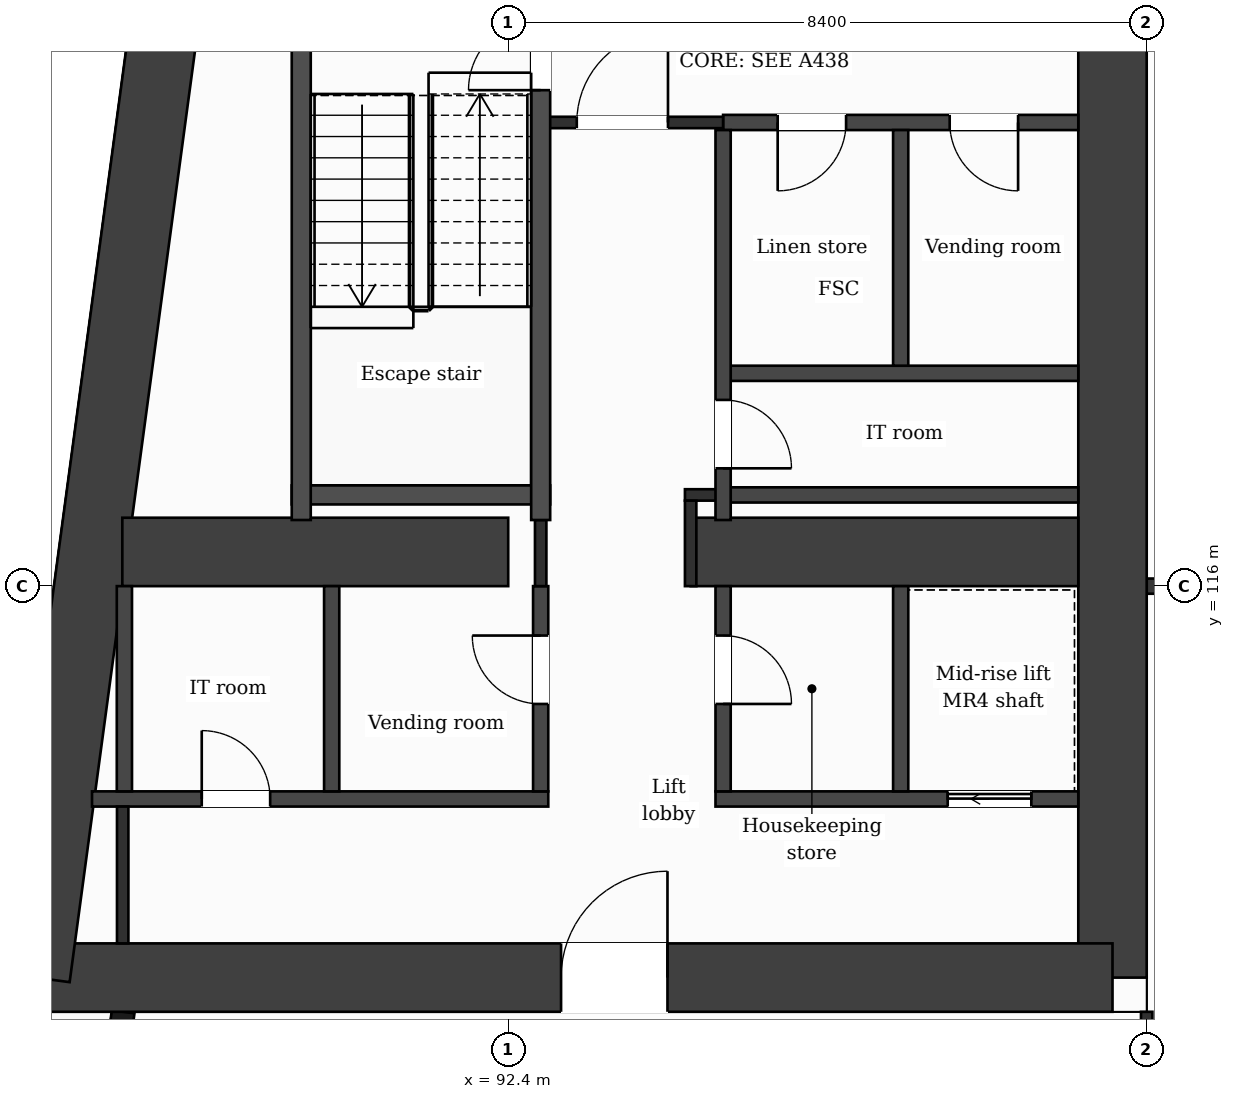
"""IFC4 building model, lengths in metres.
Left out: names, types, materials, properties, quantities, classifications, styles, units other than length and angle.
Written with IfcOpenShell. Run it as: python <this file> out.ifc"""

import sys

from ifc_helpers import new_model, si_unit, direction, frame, frame_2d, origin, place, context, subcontext, project, spatial, rectangle, extrude, element, fill, save


model = new_model("IFC4")
c1 = context("Model", 3, precision=1e-05, world=origin(), true_north=direction((0.0, 1.0)))
c2 = subcontext(c1, "Body", "Model", "MODEL_VIEW")
j1 = project(units=[si_unit("LENGTHUNIT", "METRE"), si_unit("PLANEANGLEUNIT", "RADIAN")], contexts=[c1])
p1 = place(None, origin())
s1 = spatial("IfcSite", under=j1, at=p1, CompositionType="ELEMENT")
p2 = place(p1, origin())
s2 = spatial("IfcBuilding", under=s1, at=p2, CompositionType="ELEMENT")
p3 = place(p2, frame((0.0, 0.0, 158.9)))
s3 = spatial("IfcBuildingStorey", under=s2, at=p3, CompositionType="ELEMENT", Elevation=158.9)
p4 = place(p3, frame((100.35, 131.95, 0.0), z_axis=(0.0, 0.0, 1.0), x_axis=(0.0, -1.0, 0.0)))
e1 = element("IfcWall", 1, at=p4, inside=s3, PredefinedType="SHEAR", context=c2, shape_type="SweptSolid", body=[
    extrude(rectangle(XDim=21.1, YDim=0.9, at=frame_2d((10.55, 0.0))), origin(), (0.0, 0.0, 1.0), 3.7),
])
p5 = place(p3, frame((100.35, 110.85, 0.0), z_axis=(0.0, 0.0, 1.0), x_axis=(-1.0, 0.0, 0.0)))
e2 = element("IfcWall", 2, at=p5, inside=s3, PredefinedType="SHEAR", context=c2, shape_type="SweptSolid", body=[
    extrude(rectangle(XDim=14.166, YDim=0.9, at=frame_2d((7.083, 0.0))), origin(), (0.0, 0.0, 1.0), 3.7),
])
p6 = place(p5, frame((5.855, 0.0, 0.0)))
e3 = element("IfcOpeningElement", 3, at=p6, cuts=e2, PredefinedType="OPENING", context=c2, shape_type="SweptSolid", body=[
    extrude(rectangle(XDim=1.4, YDim=2.1, at=frame_2d((0.7, 1.05))), frame((0.0, 0.46, 0.0), z_axis=(0.0, -1.0, 0.0), x_axis=(1.0, 0.0, 0.0)), (0.0, 0.0, 1.0), 0.92),
])
p7 = place(p3, frame((86.184, 110.85, 0.0), z_axis=(0.0, 0.0, 1.0), x_axis=(0.133410495943, 0.991060865725, 0.0)))
e4 = element("IfcWall", 4, at=p7, inside=s3, PredefinedType="SHEAR", context=c2, shape_type="SweptSolid", body=[
    extrude(rectangle(XDim=21.29, YDim=0.9, at=frame_2d((10.645, 0.0))), origin(), (0.0, 0.0, 1.0), 3.7),
])
p8 = place(p3, frame((87.323, 116.45, 0.0), z_axis=(0.0, 0.0, 1.0), x_axis=(1.0, 0.0, 0.0)))
e5 = element("IfcWall", 5, at=p8, inside=s3, PredefinedType="SHEAR", context=c2, shape_type="SweptSolid", body=[
    extrude(rectangle(XDim=5.077, YDim=0.9, at=frame_2d((2.539, 0.0))), origin(), (0.0, 0.0, 1.0), 3.7),
])
p9 = place(p3, frame((94.8, 116.45, 0.0), z_axis=(0.0, 0.0, 1.0), x_axis=(1.0, 0.0, 0.0)))
e6 = element("IfcWall", 6, at=p9, inside=s3, PredefinedType="SHEAR", context=c2, shape_type="SweptSolid", body=[
    extrude(rectangle(XDim=5.1, YDim=0.9, at=frame_2d((2.55, 0.0))), origin(), (0.0, 0.0, 1.0), 3.7),
])
p10 = place(p3, frame((87.334, 110.4, 0.0), z_axis=(0.0, 0.0, 1.0), x_axis=(-0.133437175554, -0.991057273915, 0.0)))
e7 = element("IfcWall", 7, at=p10, inside=s3, PredefinedType="SOLIDWALL", context=c2, shape_type="SweptSolid", body=[
    extrude(rectangle(XDim=6.781, YDim=0.3, at=frame_2d((3.39, 0.0))), origin(), (0.0, 0.0, 1.0), 3.38),
])
p11 = place(p10, frame((1.418, 0.0, 0.0)))
e8 = element("IfcOpeningElement", 8, at=p11, cuts=e7, PredefinedType="OPENING", context=c2, shape_type="SweptSolid", body=[
    extrude(rectangle(XDim=1.2, YDim=2.4, at=frame_2d((0.6, 1.2))), frame((0.0, 0.16, 0.0), z_axis=(0.0, -1.0, 0.0), x_axis=(1.0, 0.0, 0.0)), (0.0, 0.0, 1.0), 0.32),
])
p12 = place(p10, frame((4.758, 0.0, 0.9)))
e9 = element("IfcOpeningElement", 9, at=p12, cuts=e7, PredefinedType="OPENING", context=c2, shape_type="SweptSolid", body=[
    extrude(rectangle(XDim=1.2, YDim=2.1, at=frame_2d((0.6, 1.05))), frame((0.0, 0.16, 0.0), z_axis=(0.0, -1.0, 0.0), x_axis=(1.0, 0.0, 0.0)), (0.0, 0.0, 1.0), 0.32),
])
p13 = place(p3, frame((86.924, 113.2, 0.0), z_axis=(0.0, 0.0, 1.0), x_axis=(1.0, 0.0, 0.0)))
e10 = element("IfcWall", 10, at=p13, inside=s3, PredefinedType="PARTITIONING", context=c2, shape_type="SweptSolid", body=[
    extrude(rectangle(XDim=6.003, YDim=0.2, at=frame_2d((3.001, 0.0))), origin(), (0.0, 0.0, 1.0), 3.38),
])
p14 = place(p13, frame((1.444, 0.0, 0.0)))
e11 = element("IfcOpeningElement", 11, at=p14, cuts=e10, PredefinedType="OPENING", context=c2, shape_type="SweptSolid", body=[
    extrude(rectangle(XDim=0.9, YDim=2.1, at=frame_2d((0.45, 1.05))), frame((0.0, 0.11, 0.0), z_axis=(0.0, -1.0, 0.0), x_axis=(1.0, 0.0, 0.0)), (0.0, 0.0, 1.0), 0.22),
])
p15 = place(p3, frame((95.127, 113.2, 0.0), z_axis=(0.0, 0.0, 1.0), x_axis=(1.0, 0.0, 0.0)))
e12 = element("IfcWall", 12, at=p15, inside=s3, PredefinedType="PARTITIONING", context=c2, shape_type="SweptSolid", body=[
    extrude(rectangle(XDim=4.773, YDim=0.2, at=frame_2d((2.386, 0.0))), origin(), (0.0, 0.0, 1.0), 3.38),
])
p16 = place(p15, frame((3.055, 0.0, 0.0)))
e13 = element("IfcOpeningElement", 13, at=p16, cuts=e12, PredefinedType="OPENING", context=c2, shape_type="SweptSolid", body=[
    extrude(rectangle(XDim=1.1, YDim=2.1, at=frame_2d((0.55, 1.05))), frame((0.0, 0.11, 0.0), z_axis=(0.0, -1.0, 0.0), x_axis=(1.0, 0.0, 0.0)), (0.0, 0.0, 1.0), 0.22),
])
p17 = place(p3, frame((100.8, 116.0, 0.0), z_axis=(0.0, 0.0, 1.0), x_axis=(1.0, 0.0, 0.0)))
e14 = element("IfcWall", 14, at=p17, inside=s3, PredefinedType="PARTITIONING", context=c2, shape_type="SweptSolid", body=[
    extrude(rectangle(XDim=8.4, YDim=0.2, at=frame_2d((4.2, 0.0))), origin(), (0.0, 0.0, 1.0), 3.38),
])
p18 = place(p3, frame((95.227, 117.2, 0.0), z_axis=(0.0, 0.0, 1.0), x_axis=(1.0, 0.0, 0.0)))
e15 = element("IfcWall", 15, at=p18, inside=s3, PredefinedType="PARTITIONING", context=c2, shape_type="SweptSolid", body=[
    extrude(rectangle(XDim=4.673, YDim=0.2, at=frame_2d((2.336, 0.0))), origin(), (0.0, 0.0, 1.0), 3.38),
])
p19 = place(p3, frame((94.725, 117.2, 0.0), z_axis=(0.0, 0.0, 1.0), x_axis=(1.0, 0.0, 0.0)))
e16 = element("IfcWall", 16, at=p19, inside=s3, PredefinedType="PARTITIONING", context=c2, shape_type="SweptSolid", body=[
    extrude(rectangle(XDim=0.502, YDim=0.15, at=frame_2d((0.251, 0.0))), origin(), (0.0, 0.0, 1.0), 3.38),
])
p20 = place(p3, frame((89.552, 117.2, 0.0), z_axis=(0.0, 0.0, 1.0), x_axis=(1.0, 0.0, 0.0)))
e17 = element("IfcWall", 17, at=p20, inside=s3, PredefinedType="PARTITIONING", context=c2, shape_type="SweptSolid", body=[
    extrude(rectangle(XDim=3.4, YDim=0.25, at=frame_2d((1.7, 0.0))), origin(), (0.0, 0.0, 1.0), 3.38),
])
p21 = place(p3, frame((95.227, 118.8, 0.0), z_axis=(0.0, 0.0, 1.0), x_axis=(1.0, 0.0, 0.0)))
e18 = element("IfcWall", 18, at=p21, inside=s3, PredefinedType="PARTITIONING", context=c2, shape_type="SweptSolid", body=[
    extrude(rectangle(XDim=4.673, YDim=0.2, at=frame_2d((2.336, 0.0))), origin(), (0.0, 0.0, 1.0), 3.38),
])
p22 = place(p3, frame((95.227, 122.1, 0.0), z_axis=(0.0, 0.0, 1.0), x_axis=(1.0, 0.0, 0.0)))
e19 = element("IfcWall", 19, at=p22, inside=s3, PredefinedType="PARTITIONING", context=c2, shape_type="SweptSolid", body=[
    extrude(rectangle(XDim=4.673, YDim=0.2, at=frame_2d((2.336, 0.0))), origin(), (0.0, 0.0, 1.0), 3.38),
])
p23 = place(p22, frame((0.718, 0.0, 0.0)))
e20 = element("IfcOpeningElement", 20, at=p23, cuts=e19, PredefinedType="OPENING", context=c2, shape_type="SweptSolid", body=[
    extrude(rectangle(XDim=0.9, YDim=2.1, at=frame_2d((0.45, 1.05))), frame((0.0, 0.11, 0.0), z_axis=(0.0, -1.0, 0.0), x_axis=(1.0, 0.0, 0.0)), (0.0, 0.0, 1.0), 0.22),
])
p24 = place(p22, frame((2.981, 0.0, 0.0)))
e21 = element("IfcOpeningElement", 21, at=p24, cuts=e19, PredefinedType="OPENING", context=c2, shape_type="SweptSolid", body=[
    extrude(rectangle(XDim=0.9, YDim=2.1, at=frame_2d((0.45, 1.05))), frame((0.0, 0.11, 0.0), z_axis=(0.0, -1.0, 0.0), x_axis=(1.0, 0.0, 0.0)), (0.0, 0.0, 1.0), 0.22),
])
p25 = place(p3, frame((92.827, 122.1, 0.0), z_axis=(0.0, 0.0, 1.0), x_axis=(1.0, 0.0, 0.0)))
e22 = element("IfcWall", 22, at=p25, inside=s3, PredefinedType="PARTITIONING", context=c2, shape_type="SweptSolid", body=[
    extrude(rectangle(XDim=2.4, YDim=0.15, at=frame_2d((1.2, 0.0))), origin(), (0.0, 0.0, 1.0), 3.38),
])
p26 = place(p25, frame((0.475, 0.0, 0.0)))
e23 = element("IfcOpeningElement", 23, at=p26, cuts=e22, PredefinedType="OPENING", context=c2, shape_type="SweptSolid", body=[
    extrude(rectangle(XDim=1.2, YDim=2.1, at=frame_2d((0.6, 1.05))), frame((0.0, 0.085, 0.0), z_axis=(0.0, -1.0, 0.0), x_axis=(1.0, 0.0, 0.0)), (0.0, 0.0, 1.0), 0.17),
])
p27 = place(p3, frame((87.35, 113.3, 0.0), z_axis=(0.0, 0.0, 1.0), x_axis=(0.0, 1.0, 0.0)))
e24 = element("IfcWall", 24, at=p27, inside=s3, PredefinedType="PARTITIONING", context=c2, shape_type="SweptSolid", body=[
    extrude(rectangle(XDim=2.7, YDim=0.2, at=frame_2d((1.35, 0.0))), origin(), (0.0, 0.0, 1.0), 3.38),
])
p28 = place(p3, frame((87.328, 111.3, 0.0), z_axis=(0.0, 0.0, 1.0), x_axis=(0.0, 1.0, 0.0)))
e25 = element("IfcWall", 25, at=p28, inside=s3, PredefinedType="PARTITIONING", context=c2, shape_type="SweptSolid", body=[
    extrude(rectangle(XDim=1.8, YDim=0.15, at=frame_2d((0.9, 0.0))), origin(), (0.0, 0.0, 1.0), 3.38),
])
p29 = place(p3, frame((89.677, 116.87, 0.0), z_axis=(0.0, 0.0, 1.0), x_axis=(0.0, 1.0, 0.0)))
e26 = element("IfcWall", 26, at=p29, inside=s3, PredefinedType="PARTITIONING", context=c2, shape_type="SweptSolid", body=[
    extrude(rectangle(XDim=6.955, YDim=0.25, at=frame_2d((3.478, 0.0))), origin(), (0.0, 0.0, 1.0), 3.38),
])
p30 = place(p3, frame((90.077, 113.3, 0.0), z_axis=(0.0, 0.0, 1.0), x_axis=(0.0, 1.0, 0.0)))
e27 = element("IfcWall", 27, at=p30, inside=s3, PredefinedType="PARTITIONING", context=c2, shape_type="SweptSolid", body=[
    extrude(rectangle(XDim=2.7, YDim=0.2, at=frame_2d((1.35, 0.0))), origin(), (0.0, 0.0, 1.0), 3.38),
])
p31 = place(p3, frame((92.827, 113.3, 0.0), z_axis=(0.0, 0.0, 1.0), x_axis=(0.0, 1.0, 0.0)))
e28 = element("IfcWall", 28, at=p31, inside=s3, PredefinedType="PARTITIONING", context=c2, shape_type="SweptSolid", body=[
    extrude(rectangle(XDim=2.7, YDim=0.2, at=frame_2d((1.35, 0.0))), origin(), (0.0, 0.0, 1.0), 3.38),
])
p32 = place(p31, frame((1.15, 0.0, 0.0)))
e29 = element("IfcOpeningElement", 29, at=p32, cuts=e28, PredefinedType="OPENING", context=c2, shape_type="SweptSolid", body=[
    extrude(rectangle(XDim=0.9, YDim=2.1, at=frame_2d((0.45, 1.05))), frame((0.0, 0.11, 0.0), z_axis=(0.0, -1.0, 0.0), x_axis=(1.0, 0.0, 0.0)), (0.0, 0.0, 1.0), 0.22),
])
p33 = place(p3, frame((92.827, 116.0, 0.0), z_axis=(0.0, 0.0, 1.0), x_axis=(0.0, 1.0, 0.0)))
e30 = element("IfcWall", 30, at=p33, inside=s3, PredefinedType="PARTITIONING", context=c2, shape_type="SweptSolid", body=[
    extrude(rectangle(XDim=0.87, YDim=0.15, at=frame_2d((0.435, 0.0))), origin(), (0.0, 0.0, 1.0), 3.38),
])
p34 = place(p3, frame((92.827, 116.87, 0.0), z_axis=(0.0, 0.0, 1.0), x_axis=(0.0, 1.0, 0.0)))
e31 = element("IfcWall", 31, at=p34, inside=s3, PredefinedType="PARTITIONING", context=c2, shape_type="SweptSolid", body=[
    extrude(rectangle(XDim=6.955, YDim=0.25, at=frame_2d((3.478, 0.0))), origin(), (0.0, 0.0, 1.0), 3.38),
])
p35 = place(p34, frame((5.655, 0.0, 0.0)))
e32 = element("IfcOpeningElement", 32, at=p35, cuts=e31, PredefinedType="OPENING", context=c2, shape_type="SweptSolid", body=[
    extrude(rectangle(XDim=0.95, YDim=2.1, at=frame_2d((0.475, 1.05))), frame((0.0, 0.135, 0.0), z_axis=(0.0, -1.0, 0.0), x_axis=(1.0, 0.0, 0.0)), (0.0, 0.0, 1.0), 0.27),
])
p36 = place(p3, frame((94.8, 116.0, 0.0), z_axis=(0.0, 0.0, 1.0), x_axis=(0.0, 1.0, 0.0)))
e33 = element("IfcWall", 33, at=p36, inside=s3, PredefinedType="PARTITIONING", context=c2, shape_type="SweptSolid", body=[
    extrude(rectangle(XDim=1.125, YDim=0.15, at=frame_2d((0.562, 0.0))), origin(), (0.0, 0.0, 1.0), 3.38),
])
p37 = place(p3, frame((95.227, 113.3, 0.0), z_axis=(0.0, 0.0, 1.0), x_axis=(0.0, 1.0, 0.0)))
e34 = element("IfcWall", 34, at=p37, inside=s3, PredefinedType="PARTITIONING", context=c2, shape_type="SweptSolid", body=[
    extrude(rectangle(XDim=2.7, YDim=0.2, at=frame_2d((1.35, 0.0))), origin(), (0.0, 0.0, 1.0), 3.38),
])
p38 = place(p37, frame((1.15, 0.0, 0.0)))
e35 = element("IfcOpeningElement", 35, at=p38, cuts=e34, PredefinedType="OPENING", context=c2, shape_type="SweptSolid", body=[
    extrude(rectangle(XDim=0.9, YDim=2.1, at=frame_2d((0.45, 1.05))), frame((0.0, 0.11, 0.0), z_axis=(0.0, -1.0, 0.0), x_axis=(1.0, 0.0, 0.0)), (0.0, 0.0, 1.0), 0.22),
])
p39 = place(p3, frame((95.227, 116.87, 0.0), z_axis=(0.0, 0.0, 1.0), x_axis=(0.0, 1.0, 0.0)))
e36 = element("IfcWall", 36, at=p39, inside=s3, PredefinedType="PARTITIONING", context=c2, shape_type="SweptSolid", body=[
    extrude(rectangle(XDim=5.13, YDim=0.2, at=frame_2d((2.565, 0.0))), origin(), (0.0, 0.0, 1.0), 3.38),
])
p40 = place(p39, frame((0.68, 0.0, 0.0)))
e37 = element("IfcOpeningElement", 37, at=p40, cuts=e36, PredefinedType="OPENING", context=c2, shape_type="SweptSolid", body=[
    extrude(rectangle(XDim=0.9, YDim=2.1, at=frame_2d((0.45, 1.05))), frame((0.0, 0.11, 0.0), z_axis=(0.0, -1.0, 0.0), x_axis=(1.0, 0.0, 0.0)), (0.0, 0.0, 1.0), 0.22),
])
p41 = place(p3, frame((97.563, 113.3, 0.0), z_axis=(0.0, 0.0, 1.0), x_axis=(0.0, 1.0, 0.0)))
e38 = element("IfcWall", 38, at=p41, inside=s3, PredefinedType="PARTITIONING", context=c2, shape_type="SweptSolid", body=[
    extrude(rectangle(XDim=2.7, YDim=0.2, at=frame_2d((1.35, 0.0))), origin(), (0.0, 0.0, 1.0), 3.38),
])
p42 = place(p3, frame((97.563, 118.9, 0.0), z_axis=(0.0, 0.0, 1.0), x_axis=(0.0, 1.0, 0.0)))
e39 = element("IfcWall", 39, at=p42, inside=s3, PredefinedType="PARTITIONING", context=c2, shape_type="SweptSolid", body=[
    extrude(rectangle(XDim=3.1, YDim=0.2, at=frame_2d((1.55, 0.0))), origin(), (0.0, 0.0, 1.0), 3.38),
])
p43 = place(p3, frame((100.8, 109.075, 0.0), z_axis=(0.0, 0.0, 1.0), x_axis=(0.0, 1.0, 0.0)))
e40 = element("IfcWall", 40, at=p43, inside=s3, PredefinedType="PARTITIONING", context=c2, shape_type="SweptSolid", body=[
    extrude(rectangle(XDim=1.325, YDim=0.15, at=frame_2d((0.663, 0.0))), origin(), (0.0, 0.0, 1.0), 3.38),
])
p44 = place(p26, origin())
e41 = element("IfcDoor", 41, at=p44, inside=s3, OperationType="SINGLE_SWING_RIGHT", PredefinedType="DOOR", context=c2, shape_type="SweptSolid", body=[
    extrude(rectangle(XDim=1.2, YDim=2.1, at=frame_2d((0.6, 1.05))), frame((0.0, 0.025, 0.0), z_axis=(0.0, -1.0, 0.0), x_axis=(1.0, 0.0, 0.0)), (0.0, 0.0, 1.0), 0.05),
])
fill(e23, e41)
p45 = place(p23, origin())
e42 = element("IfcDoor", 42, at=p45, inside=s3, OperationType="SINGLE_SWING_LEFT", PredefinedType="DOOR", context=c2, shape_type="SweptSolid", body=[
    extrude(rectangle(XDim=0.9, YDim=2.1, at=frame_2d((0.45, 1.05))), frame((0.0, 0.025, 0.0), z_axis=(0.0, -1.0, 0.0), x_axis=(1.0, 0.0, 0.0)), (0.0, 0.0, 1.0), 0.05),
])
fill(e20, e42)
p46 = place(p24, origin())
e43 = element("IfcDoor", 43, at=p46, inside=s3, OperationType="SINGLE_SWING_RIGHT", PredefinedType="DOOR", context=c2, shape_type="SweptSolid", body=[
    extrude(rectangle(XDim=0.9, YDim=2.1, at=frame_2d((0.45, 1.05))), frame((0.0, 0.025, 0.0), z_axis=(0.0, -1.0, 0.0), x_axis=(1.0, 0.0, 0.0)), (0.0, 0.0, 1.0), 0.05),
])
fill(e21, e43)
p47 = place(p35, origin())
e44 = element("IfcDoor", 44, at=p47, inside=s3, OperationType="SINGLE_SWING_LEFT", PredefinedType="DOOR", context=c2, shape_type="SweptSolid", body=[
    extrude(rectangle(XDim=0.95, YDim=2.1, at=frame_2d((0.475, 1.05))), frame((0.0, 0.025, 0.0), z_axis=(0.0, -1.0, 0.0), x_axis=(1.0, 0.0, 0.0)), (0.0, 0.0, 1.0), 0.05),
])
fill(e32, e44)
p48 = place(p40, origin())
e45 = element("IfcDoor", 45, at=p48, inside=s3, OperationType="SINGLE_SWING_LEFT", PredefinedType="DOOR", context=c2, shape_type="SweptSolid", body=[
    extrude(rectangle(XDim=0.9, YDim=2.1, at=frame_2d((0.45, 1.05))), frame((0.0, 0.025, 0.0), z_axis=(0.0, -1.0, 0.0), x_axis=(1.0, 0.0, 0.0)), (0.0, 0.0, 1.0), 0.05),
])
fill(e37, e45)
p49 = place(p16, origin())
e46 = element("IfcDoor", 46, at=p49, inside=s3, OperationType="SLIDING_TO_LEFT", PredefinedType="DOOR", context=c2, shape_type="SweptSolid", body=[
    extrude(rectangle(XDim=1.1, YDim=2.1, at=frame_2d((0.55, 1.05))), frame((0.0, 0.025, 0.0), z_axis=(0.0, -1.0, 0.0), x_axis=(1.0, 0.0, 0.0)), (0.0, 0.0, 1.0), 0.05),
])
fill(e13, e46)
p50 = place(p14, origin())
e47 = element("IfcDoor", 47, at=p50, inside=s3, OperationType="SINGLE_SWING_LEFT", PredefinedType="DOOR", context=c2, shape_type="SweptSolid", body=[
    extrude(rectangle(XDim=0.9, YDim=2.1, at=frame_2d((0.45, 1.05))), frame((0.0, 0.025, 0.0), z_axis=(0.0, -1.0, 0.0), x_axis=(1.0, 0.0, 0.0)), (0.0, 0.0, 1.0), 0.05),
])
fill(e11, e47)
p51 = place(p32, origin())
e48 = element("IfcDoor", 48, at=p51, inside=s3, OperationType="SINGLE_SWING_RIGHT", PredefinedType="DOOR", context=c2, shape_type="SweptSolid", body=[
    extrude(rectangle(XDim=0.9, YDim=2.1, at=frame_2d((0.45, 1.05))), frame((0.0, 0.025, 0.0), z_axis=(0.0, -1.0, 0.0), x_axis=(1.0, 0.0, 0.0)), (0.0, 0.0, 1.0), 0.05),
])
fill(e29, e48)
p52 = place(p38, origin())
e49 = element("IfcDoor", 49, at=p52, inside=s3, OperationType="SINGLE_SWING_LEFT", PredefinedType="DOOR", context=c2, shape_type="SweptSolid", body=[
    extrude(rectangle(XDim=0.9, YDim=2.1, at=frame_2d((0.45, 1.05))), frame((0.0, 0.025, 0.0), z_axis=(0.0, -1.0, 0.0), x_axis=(1.0, 0.0, 0.0)), (0.0, 0.0, 1.0), 0.05),
])
fill(e35, e49)
p53 = place(p6, origin())
e50 = element("IfcDoor", 50, at=p53, inside=s3, OperationType="SINGLE_SWING_LEFT", PredefinedType="DOOR", context=c2, shape_type="SweptSolid", body=[
    extrude(rectangle(XDim=1.4, YDim=2.1, at=frame_2d((0.7, 1.05))), frame((0.0, 0.025, 0.0), z_axis=(0.0, -1.0, 0.0), x_axis=(1.0, 0.0, 0.0)), (0.0, 0.0, 1.0), 0.05),
])
fill(e3, e50)
save(model, sys.argv[1])
